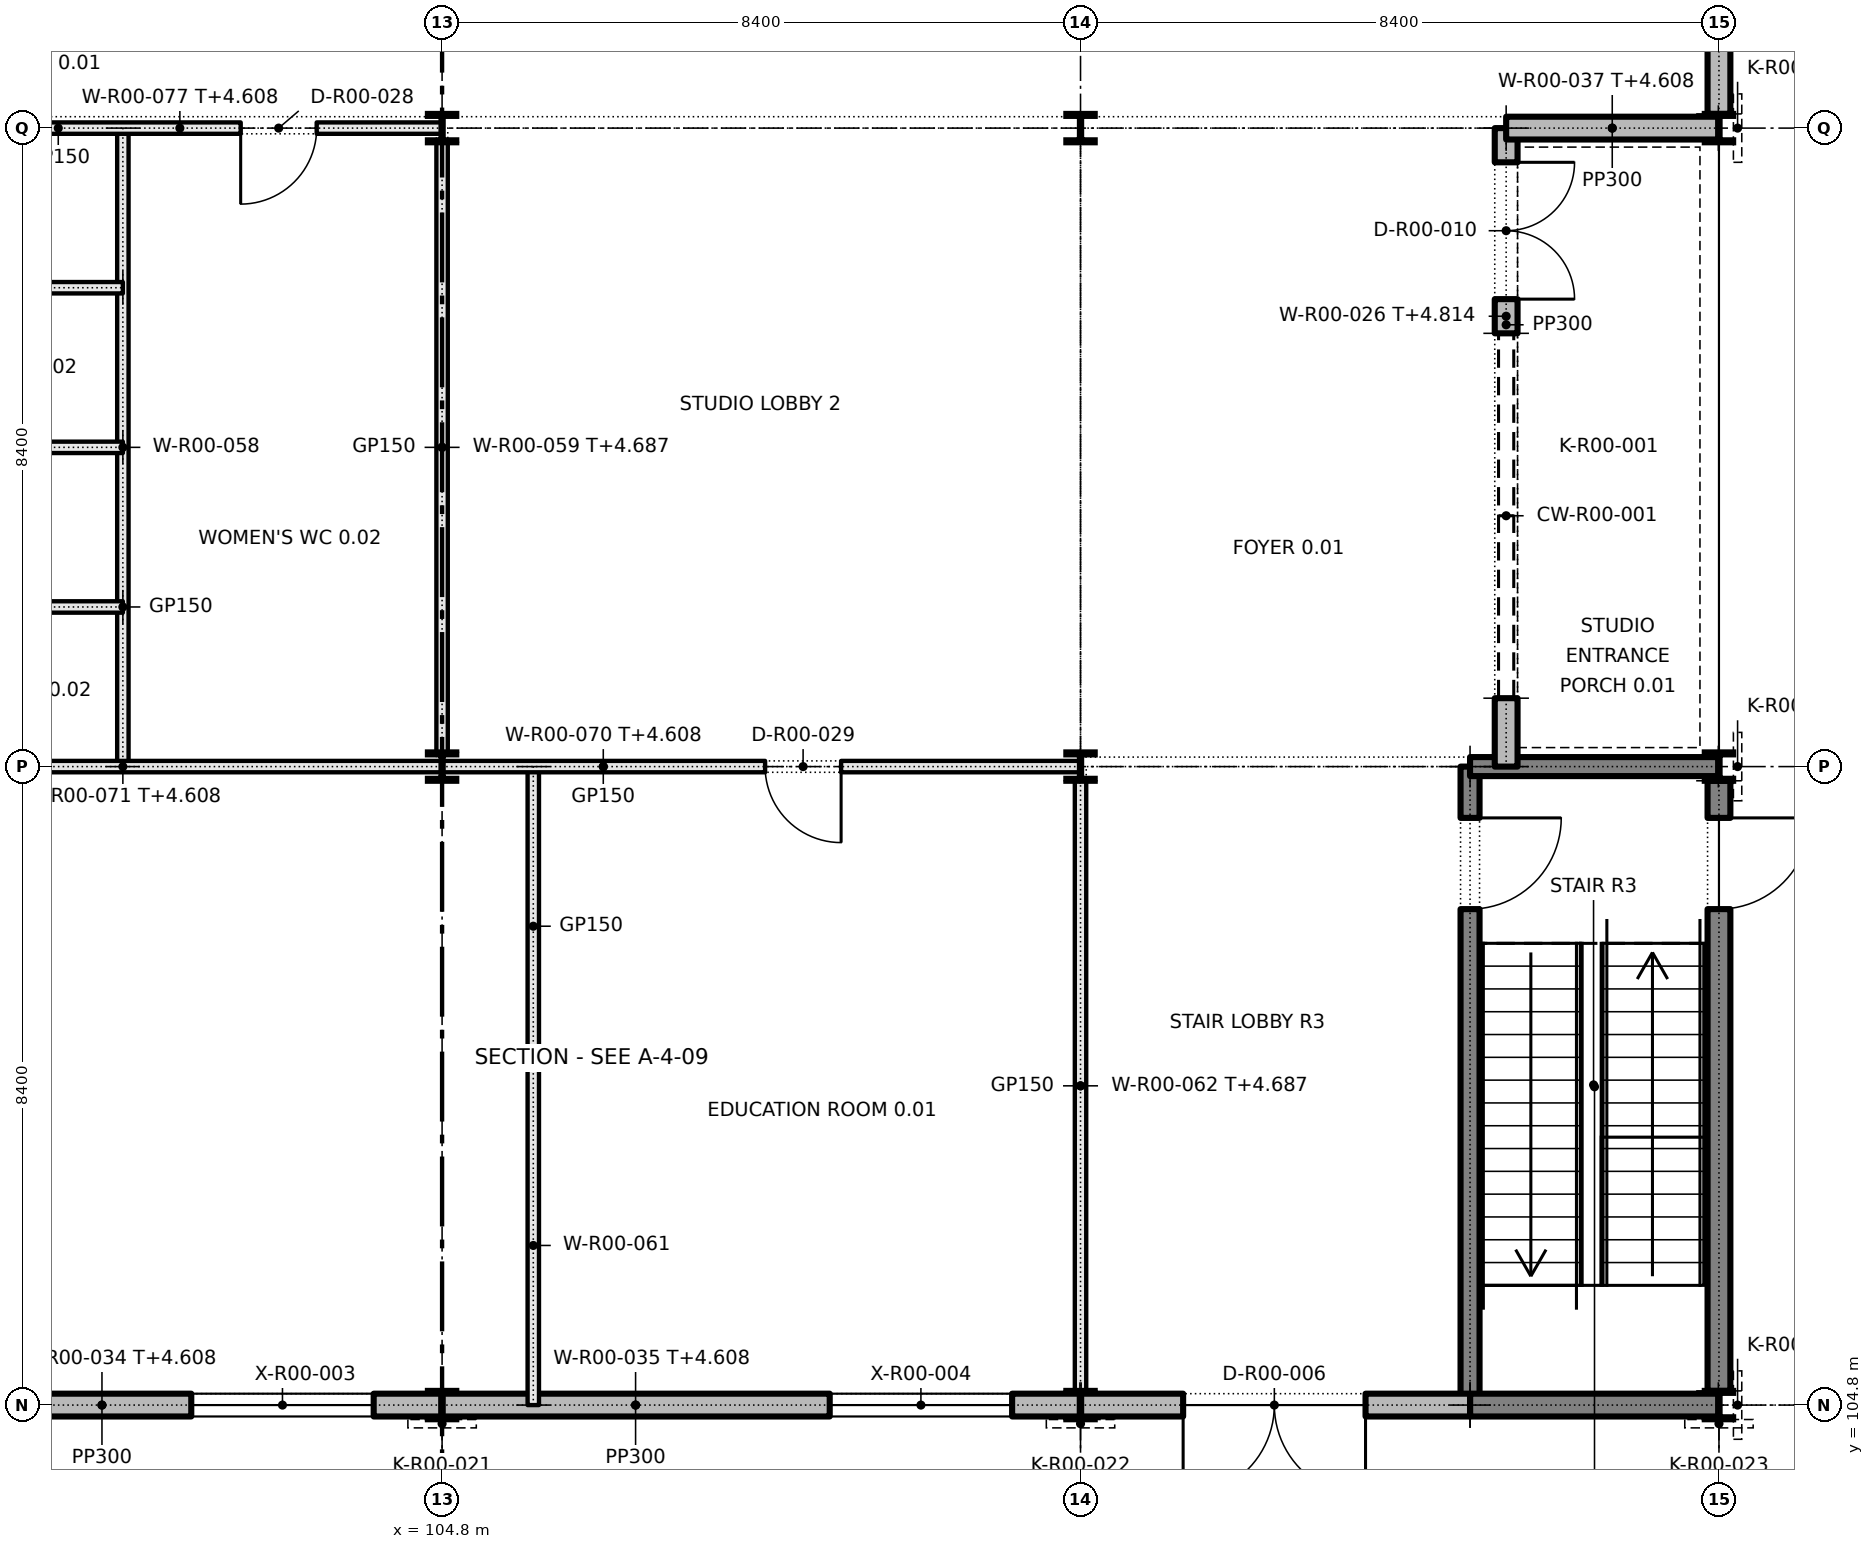
"""IFC4 building model, lengths in metres.
Left out: names, types, materials, properties, quantities, classifications, styles, units other than length and angle.
Written with IfcOpenShell. Run it as: python <this file> out.ifc"""

import sys

from ifc_helpers import new_model, si_unit, direction, frame, frame_2d, origin, origin_2d, place, context, subcontext, project, spatial, rectangle, i_section, extrude, element, fill, save


model = new_model("IFC4")
c1 = context("Model", 3, precision=1e-05, world=origin(), true_north=direction((0.0, 1.0)))
c2 = subcontext(c1, "Body", "Model", "MODEL_VIEW")
j1 = project(units=[si_unit("LENGTHUNIT", "METRE"), si_unit("PLANEANGLEUNIT", "RADIAN")], contexts=[c1])
p1 = place(None, origin())
s1 = spatial("IfcSite", under=j1, at=p1, CompositionType="ELEMENT")
p2 = place(p1, origin())
s2 = spatial("IfcBuilding", under=s1, at=p2, CompositionType="ELEMENT")
p3 = place(p2, origin())
s3 = spatial("IfcBuildingStorey", under=s2, at=p3, CompositionType="ELEMENT", Elevation=0.0)
for number, where, z_axis, x_axis in (
    (1, (104.8, 104.8, 0.0), (0.0, 0.0, 1.0), (1.0, 0.0, 0.0)),
    (2, (104.8, 113.2, 0.0), (0.0, 0.0, 1.0), (1.0, 0.0, 0.0)),
    (3, (104.8, 121.6, 0.0), (0.0, 0.0, 1.0), (1.0, 0.0, 0.0)),
    (4, (113.2, 104.8, 0.0), (0.0, 0.0, 1.0), (1.0, 0.0, 0.0)),
    (5, (113.2, 113.2, 0.0), (0.0, 0.0, 1.0), (1.0, 0.0, 0.0)),
    (6, (113.2, 121.6, 0.0), (0.0, 0.0, 1.0), (1.0, 0.0, 0.0)),
    (7, (121.6, 104.8, 0.0), (0.0, 0.0, 1.0), (1.0, 0.0, 0.0)),
    (8, (121.6, 113.2, 0.0), (0.0, 0.0, 1.0), (1.0, 0.0, 0.0)),
    (9, (121.6, 121.6, 0.0), (0.0, 0.0, 1.0), (1.0, 0.0, 0.0)),
):
    element("IfcColumn", number, at=place(p3, frame(where, z_axis=z_axis, x_axis=x_axis)), inside=s3, PredefinedType="COLUMN", context=c2, shape_type="SweptSolid", body=[
        extrude(i_section(OverallWidth=0.373, OverallDepth=0.373, WebThickness=0.016, FlangeThickness=0.026, FilletRadius=0.015, at=origin_2d()), origin(), (0.0, 0.0, 1.0), 5.4),
    ])
p4 = place(p3, frame((118.325, 104.8, 0.0), z_axis=(0.0, 0.0, 1.0), x_axis=(0.0, 1.0, 0.0)))
e10 = element("IfcWall", 10, at=p4, inside=s3, PredefinedType="SHEAR", context=c2, shape_type="SweptSolid", body=[
    extrude(rectangle(XDim=8.4, YDim=0.25, at=frame_2d((4.2, 0.0))), origin(), (0.0, 0.0, 1.0), 5.4),
])
p5 = place(p4, frame((6.525, 0.0, 0.0)))
e11 = element("IfcOpeningElement", 11, at=p5, cuts=e10, PredefinedType="OPENING", context=c2, shape_type="SweptSolid", body=[
    extrude(rectangle(XDim=1.2, YDim=2.1, at=frame_2d((0.6, 1.05))), frame((0.0, 0.135, 0.0), z_axis=(0.0, -1.0, 0.0), x_axis=(1.0, 0.0, 0.0)), (0.0, 0.0, 1.0), 0.27),
])
p6 = place(p3, frame((121.6, 104.987, 0.0), z_axis=(0.0, 0.0, 1.0), x_axis=(0.0, 1.0, 0.0)))
e12 = element("IfcWall", 12, at=p6, inside=s3, PredefinedType="SHEAR", context=c2, shape_type="SweptSolid", body=[
    extrude(rectangle(XDim=8.027, YDim=0.3, at=frame_2d((4.013, 0.0))), origin(), (0.0, 0.0, 1.0), 5.4),
])
p7 = place(p6, frame((6.338, 0.0, 0.0)))
e13 = element("IfcOpeningElement", 13, at=p7, cuts=e12, PredefinedType="OPENING", context=c2, shape_type="SweptSolid", body=[
    extrude(rectangle(XDim=1.2, YDim=2.1, at=frame_2d((0.6, 1.05))), frame((0.0, 0.16, 0.0), z_axis=(0.0, -1.0, 0.0), x_axis=(1.0, 0.0, 0.0)), (0.0, 0.0, 1.0), 0.32),
])
p8 = place(p3, frame((118.325, 104.8, 0.0), z_axis=(0.0, 0.0, 1.0), x_axis=(1.0, 0.0, 0.0)))
e14 = element("IfcWall", 14, at=p8, inside=s3, PredefinedType="SHEAR", context=c2, shape_type="SweptSolid", body=[
    extrude(rectangle(XDim=3.267, YDim=0.3, at=frame_2d((1.633, 0.0))), origin(), (0.0, 0.0, 1.0), 5.4),
])
p9 = place(p3, frame((118.325, 113.2, 0.0), z_axis=(0.0, 0.0, 1.0), x_axis=(1.0, 0.0, 0.0)))
e15 = element("IfcWall", 15, at=p9, inside=s3, PredefinedType="SHEAR", context=c2, shape_type="SweptSolid", body=[
    extrude(rectangle(XDim=3.267, YDim=0.25, at=frame_2d((1.633, 0.0))), origin(), (0.0, 0.0, 1.0), 5.4),
])
p10 = place(p3, frame((118.8, 113.2, 0.0), z_axis=(0.0, 0.0, 1.0), x_axis=(0.0, 1.0, 0.0)))
e16 = element("IfcWall", 16, at=p10, inside=s3, PredefinedType="SOLIDWALL", context=c2, shape_type="SweptSolid", body=[
    extrude(rectangle(XDim=0.9, YDim=0.3, at=frame_2d((0.45, 0.0))), origin(), (0.0, 0.0, 1.0), 4.814),
])
p11 = place(p3, frame((118.8, 118.9, 0.0), z_axis=(0.0, 0.0, 1.0), x_axis=(0.0, 1.0, 0.0)))
e17 = element("IfcWall", 17, at=p11, inside=s3, PredefinedType="SOLIDWALL", context=c2, shape_type="SweptSolid", body=[
    extrude(rectangle(XDim=2.7, YDim=0.3, at=frame_2d((1.35, 0.0))), origin(), (0.0, 0.0, 1.0), 4.814),
])
p12 = place(p11, frame((0.45, 0.0, 0.0)))
e18 = element("IfcOpeningElement", 18, at=p12, cuts=e17, PredefinedType="OPENING", context=c2, shape_type="SweptSolid", body=[
    extrude(rectangle(XDim=1.8, YDim=2.1, at=frame_2d((0.9, 1.05))), frame((0.0, 0.16, 0.0), z_axis=(0.0, -1.0, 0.0), x_axis=(1.0, 0.0, 0.0)), (0.0, 0.0, 1.0), 0.32),
])
p13 = place(p3, frame((121.6, 121.787, 0.0), z_axis=(0.0, 0.0, 1.0), x_axis=(0.0, 1.0, 0.0)))
e19 = element("IfcWall", 19, at=p13, inside=s3, PredefinedType="SOLIDWALL", context=c2, shape_type="SweptSolid", body=[
    extrude(rectangle(XDim=8.027, YDim=0.3, at=frame_2d((4.013, 0.0))), origin(), (0.0, 0.0, 1.0), 4.687),
])
p14 = place(p13, frame((4.913, 0.0, 0.95)))
e20 = element("IfcOpeningElement", 20, at=p14, cuts=e19, PredefinedType="OPENING", context=c2, shape_type="SweptSolid", body=[
    extrude(rectangle(XDim=2.4, YDim=1.8, at=frame_2d((1.2, 0.9))), frame((0.0, 0.16, 0.0), z_axis=(0.0, -1.0, 0.0), x_axis=(1.0, 0.0, 0.0)), (0.0, 0.0, 1.0), 0.32),
])
p15 = place(p3, frame((96.392, 104.8, 0.0), z_axis=(0.0, 0.0, 1.0), x_axis=(1.0, 0.0, 0.0)))
e21 = element("IfcWall", 21, at=p15, inside=s3, PredefinedType="SOLIDWALL", context=c2, shape_type="SweptSolid", body=[
    extrude(rectangle(XDim=8.416, YDim=0.3, at=frame_2d((4.208, 0.0))), origin(), (0.0, 0.0, 1.0), 4.608),
])
p16 = place(p15, frame((0.358, 0.0, 0.0)))
e22 = element("IfcOpeningElement", 22, at=p16, cuts=e21, PredefinedType="OPENING", context=c2, shape_type="SweptSolid", body=[
    extrude(rectangle(XDim=2.4, YDim=2.1, at=frame_2d((1.2, 1.05))), frame((0.0, 0.16, 0.0), z_axis=(0.0, -1.0, 0.0), x_axis=(1.0, 0.0, 0.0)), (0.0, 0.0, 1.0), 0.32),
])
p17 = place(p15, frame((5.108, 0.0, 0.95)))
e23 = element("IfcOpeningElement", 23, at=p17, cuts=e21, PredefinedType="OPENING", context=c2, shape_type="SweptSolid", body=[
    extrude(rectangle(XDim=2.4, YDim=1.8, at=frame_2d((1.2, 0.9))), frame((0.0, 0.16, 0.0), z_axis=(0.0, -1.0, 0.0), x_axis=(1.0, 0.0, 0.0)), (0.0, 0.0, 1.0), 0.32),
])
p18 = place(p3, frame((104.792, 104.8, 0.0), z_axis=(0.0, 0.0, 1.0), x_axis=(1.0, 0.0, 0.0)))
e24 = element("IfcWall", 24, at=p18, inside=s3, PredefinedType="SOLIDWALL", context=c2, shape_type="SweptSolid", body=[
    extrude(rectangle(XDim=8.417, YDim=0.3, at=frame_2d((4.208, 0.0))), origin(), (0.0, 0.0, 1.0), 4.608),
])
p19 = place(p18, frame((5.108, 0.0, 0.95)))
e25 = element("IfcOpeningElement", 25, at=p19, cuts=e24, PredefinedType="OPENING", context=c2, shape_type="SweptSolid", body=[
    extrude(rectangle(XDim=2.4, YDim=1.8, at=frame_2d((1.2, 0.9))), frame((0.0, 0.16, 0.0), z_axis=(0.0, -1.0, 0.0), x_axis=(1.0, 0.0, 0.0)), (0.0, 0.0, 1.0), 0.32),
])
p20 = place(p3, frame((113.192, 104.8, 0.0), z_axis=(0.0, 0.0, 1.0), x_axis=(1.0, 0.0, 0.0)))
e26 = element("IfcWall", 26, at=p20, inside=s3, PredefinedType="SOLIDWALL", context=c2, shape_type="SweptSolid", body=[
    extrude(rectangle(XDim=5.133, YDim=0.3, at=frame_2d((2.566, 0.0))), origin(), (0.0, 0.0, 1.0), 4.608),
])
p21 = place(p20, frame((1.358, 0.0, 0.0)))
e27 = element("IfcOpeningElement", 27, at=p21, cuts=e26, PredefinedType="OPENING", context=c2, shape_type="SweptSolid", body=[
    extrude(rectangle(XDim=2.4, YDim=2.1, at=frame_2d((1.2, 1.05))), frame((0.0, 0.16, 0.0), z_axis=(0.0, -1.0, 0.0), x_axis=(1.0, 0.0, 0.0)), (0.0, 0.0, 1.0), 0.32),
])
p22 = place(p3, frame((118.8, 121.6, 0.0), z_axis=(0.0, 0.0, 1.0), x_axis=(1.0, 0.0, 0.0)))
e28 = element("IfcWall", 28, at=p22, inside=s3, PredefinedType="SOLIDWALL", context=c2, shape_type="SweptSolid", body=[
    extrude(rectangle(XDim=2.792, YDim=0.3, at=frame_2d((1.396, 0.0))), origin(), (0.0, 0.0, 1.0), 4.608),
])
p23 = place(p3, frame((100.6, 113.2, 0.0), z_axis=(0.0, 0.0, 1.0), x_axis=(0.0, 1.0, 0.0)))
e29 = element("IfcWall", 29, at=p23, inside=s3, PredefinedType="PARTITIONING", context=c2, shape_type="SweptSolid", body=[
    extrude(rectangle(XDim=8.4, YDim=0.15, at=frame_2d((4.2, 0.0))), origin(), (0.0, 0.0, 1.0), 5.4),
])
p24 = place(p3, frame((104.8, 113.387, 0.0), z_axis=(0.0, 0.0, 1.0), x_axis=(0.0, 1.0, 0.0)))
e30 = element("IfcWall", 30, at=p24, inside=s3, PredefinedType="PARTITIONING", context=c2, shape_type="SweptSolid", body=[
    extrude(rectangle(XDim=8.027, YDim=0.15, at=frame_2d((4.013, 0.0))), origin(), (0.0, 0.0, 1.0), 4.687),
])
p25 = place(p3, frame((106.0, 104.8, 0.0), z_axis=(0.0, 0.0, 1.0), x_axis=(0.0, 1.0, 0.0)))
e31 = element("IfcWall", 31, at=p25, inside=s3, PredefinedType="PARTITIONING", context=c2, shape_type="SweptSolid", body=[
    extrude(rectangle(XDim=8.4, YDim=0.15, at=frame_2d((4.2, 0.0))), origin(), (0.0, 0.0, 1.0), 5.4),
])
p26 = place(p3, frame((113.2, 104.987, 0.0), z_axis=(0.0, 0.0, 1.0), x_axis=(0.0, 1.0, 0.0)))
e32 = element("IfcWall", 32, at=p26, inside=s3, PredefinedType="PARTITIONING", context=c2, shape_type="SweptSolid", body=[
    extrude(rectangle(XDim=8.027, YDim=0.15, at=frame_2d((4.013, 0.0))), origin(), (0.0, 0.0, 1.0), 4.687),
])
p27 = place(p3, frame((104.792, 113.2, 0.0), z_axis=(0.0, 0.0, 1.0), x_axis=(1.0, 0.0, 0.0)))
e33 = element("IfcWall", 33, at=p27, inside=s3, PredefinedType="PARTITIONING", context=c2, shape_type="SweptSolid", body=[
    extrude(rectangle(XDim=8.4, YDim=0.15, at=frame_2d((4.2, 0.0))), origin(), (0.0, 0.0, 1.0), 4.608),
])
p28 = place(p27, frame((4.258, 0.0, 0.0)))
e34 = element("IfcOpeningElement", 34, at=p28, cuts=e33, PredefinedType="OPENING", context=c2, shape_type="SweptSolid", body=[
    extrude(rectangle(XDim=1.0, YDim=2.1, at=frame_2d((0.5, 1.05))), frame((0.0, 0.085, 0.0), z_axis=(0.0, -1.0, 0.0), x_axis=(1.0, 0.0, 0.0)), (0.0, 0.0, 1.0), 0.17),
])
p29 = place(p3, frame((96.392, 113.2, 0.0), z_axis=(0.0, 0.0, 1.0), x_axis=(1.0, 0.0, 0.0)))
e35 = element("IfcWall", 35, at=p29, inside=s3, PredefinedType="PARTITIONING", context=c2, shape_type="SweptSolid", body=[
    extrude(rectangle(XDim=8.416, YDim=0.15, at=frame_2d((4.208, 0.0))), origin(), (0.0, 0.0, 1.0), 4.608),
])
for number, where, z_axis, x_axis in (
    (36, (96.4, 115.3, 0.0), (0.0, 0.0, 1.0), (1.0, 0.0, 0.0)),
    (37, (96.4, 117.4, 0.0), (0.0, 0.0, 1.0), (1.0, 0.0, 0.0)),
    (38, (96.4, 119.5, 0.0), (0.0, 0.0, 1.0), (1.0, 0.0, 0.0)),
):
    element("IfcWall", number, at=place(p3, frame(where, z_axis=z_axis, x_axis=x_axis)), inside=s3, PredefinedType="PARTITIONING", context=c2, shape_type="SweptSolid", body=[
        extrude(rectangle(XDim=4.2, YDim=0.15, at=frame_2d((2.1, 0.0))), origin(), (0.0, 0.0, 1.0), 5.4),
    ])
p30 = place(p3, frame((96.408, 121.6, 0.0), z_axis=(0.0, 0.0, 1.0), x_axis=(1.0, 0.0, 0.0)))
e39 = element("IfcWall", 39, at=p30, inside=s3, PredefinedType="PARTITIONING", context=c2, shape_type="SweptSolid", body=[
    extrude(rectangle(XDim=8.384, YDim=0.15, at=frame_2d((4.192, 0.0))), origin(), (0.0, 0.0, 1.0), 4.608),
])
p31 = place(p30, frame((1.542, 0.0, 0.0)))
e40 = element("IfcOpeningElement", 40, at=p31, cuts=e39, PredefinedType="OPENING", context=c2, shape_type="SweptSolid", body=[
    extrude(rectangle(XDim=1.0, YDim=2.1, at=frame_2d((0.5, 1.05))), frame((0.0, 0.085, 0.0), z_axis=(0.0, -1.0, 0.0), x_axis=(1.0, 0.0, 0.0)), (0.0, 0.0, 1.0), 0.17),
])
p32 = place(p30, frame((5.742, 0.0, 0.0)))
e41 = element("IfcOpeningElement", 41, at=p32, cuts=e39, PredefinedType="OPENING", context=c2, shape_type="SweptSolid", body=[
    extrude(rectangle(XDim=1.0, YDim=2.1, at=frame_2d((0.5, 1.05))), frame((0.0, 0.085, 0.0), z_axis=(0.0, -1.0, 0.0), x_axis=(1.0, 0.0, 0.0)), (0.0, 0.0, 1.0), 0.17),
])
p33 = place(p7, frame((1.2, 0.0, 0.0), z_axis=(0.0, 0.0, 1.0), x_axis=(-1.0, 0.0, 0.0)))
e42 = element("IfcDoor", 42, at=p33, inside=s3, OperationType="SINGLE_SWING_LEFT", PredefinedType="DOOR", context=c2, shape_type="SweptSolid", body=[
    extrude(rectangle(XDim=1.2, YDim=2.1, at=frame_2d((0.6, 1.05))), frame((0.0, 0.025, 0.0), z_axis=(0.0, -1.0, 0.0), x_axis=(1.0, 0.0, 0.0)), (0.0, 0.0, 1.0), 0.05),
])
fill(e13, e42)
p34 = place(p21, frame((2.4, 0.0, 0.0), z_axis=(0.0, 0.0, 1.0), x_axis=(-1.0, 0.0, 0.0)))
e43 = element("IfcDoor", 43, at=p34, inside=s3, OperationType="DOUBLE_DOOR_SINGLE_SWING", PredefinedType="DOOR", context=c2, shape_type="SweptSolid", body=[
    extrude(rectangle(XDim=2.4, YDim=2.1, at=frame_2d((1.2, 1.05))), frame((0.0, 0.025, 0.0), z_axis=(0.0, -1.0, 0.0), x_axis=(1.0, 0.0, 0.0)), (0.0, 0.0, 1.0), 0.05),
])
fill(e27, e43)
p35 = place(p17, origin())
e44 = element("IfcWindow", 44, at=p35, inside=s3, PartitioningType="DOUBLE_PANEL_VERTICAL", PredefinedType="WINDOW", context=c2, shape_type="SweptSolid", body=[
    extrude(rectangle(XDim=2.4, YDim=1.8, at=frame_2d((1.2, 0.9))), frame((0.0, 0.03, 0.0), z_axis=(0.0, -1.0, 0.0), x_axis=(1.0, 0.0, 0.0)), (0.0, 0.0, 1.0), 0.06),
])
fill(e23, e44)
p36 = place(p19, origin())
e45 = element("IfcWindow", 45, at=p36, inside=s3, PartitioningType="DOUBLE_PANEL_VERTICAL", PredefinedType="WINDOW", context=c2, shape_type="SweptSolid", body=[
    extrude(rectangle(XDim=2.4, YDim=1.8, at=frame_2d((1.2, 0.9))), frame((0.0, 0.03, 0.0), z_axis=(0.0, -1.0, 0.0), x_axis=(1.0, 0.0, 0.0)), (0.0, 0.0, 1.0), 0.06),
])
fill(e25, e45)
p37 = place(p12, frame((1.8, 0.0, 0.0), z_axis=(0.0, 0.0, 1.0), x_axis=(-1.0, 0.0, 0.0)))
e46 = element("IfcDoor", 46, at=p37, inside=s3, OperationType="DOUBLE_DOOR_SINGLE_SWING", PredefinedType="DOOR", context=c2, shape_type="SweptSolid", body=[
    extrude(rectangle(XDim=1.8, YDim=2.1, at=frame_2d((0.9, 1.05))), frame((0.0, 0.025, 0.0), z_axis=(0.0, -1.0, 0.0), x_axis=(1.0, 0.0, 0.0)), (0.0, 0.0, 1.0), 0.05),
])
fill(e18, e46)
p38 = place(p5, frame((1.2, 0.0, 0.0), z_axis=(0.0, 0.0, 1.0), x_axis=(-1.0, 0.0, 0.0)))
e47 = element("IfcDoor", 47, at=p38, inside=s3, OperationType="SINGLE_SWING_LEFT", PredefinedType="DOOR", context=c2, shape_type="SweptSolid", body=[
    extrude(rectangle(XDim=1.2, YDim=2.1, at=frame_2d((0.6, 1.05))), frame((0.0, 0.025, 0.0), z_axis=(0.0, -1.0, 0.0), x_axis=(1.0, 0.0, 0.0)), (0.0, 0.0, 1.0), 0.05),
])
fill(e11, e47)
p39 = place(p32, frame((1.0, 0.0, 0.0), z_axis=(0.0, 0.0, 1.0), x_axis=(-1.0, 0.0, 0.0)))
e48 = element("IfcDoor", 48, at=p39, inside=s3, OperationType="SINGLE_SWING_RIGHT", PredefinedType="DOOR", context=c2, shape_type="SweptSolid", body=[
    extrude(rectangle(XDim=1.0, YDim=2.1, at=frame_2d((0.5, 1.05))), frame((0.0, 0.025, 0.0), z_axis=(0.0, -1.0, 0.0), x_axis=(1.0, 0.0, 0.0)), (0.0, 0.0, 1.0), 0.05),
])
fill(e41, e48)
p40 = place(p28, frame((1.0, 0.0, 0.0), z_axis=(0.0, 0.0, 1.0), x_axis=(-1.0, 0.0, 0.0)))
e49 = element("IfcDoor", 49, at=p40, inside=s3, OperationType="SINGLE_SWING_LEFT", PredefinedType="DOOR", context=c2, shape_type="SweptSolid", body=[
    extrude(rectangle(XDim=1.0, YDim=2.1, at=frame_2d((0.5, 1.05))), frame((0.0, 0.025, 0.0), z_axis=(0.0, -1.0, 0.0), x_axis=(1.0, 0.0, 0.0)), (0.0, 0.0, 1.0), 0.05),
])
fill(e34, e49)
save(model, sys.argv[1])
